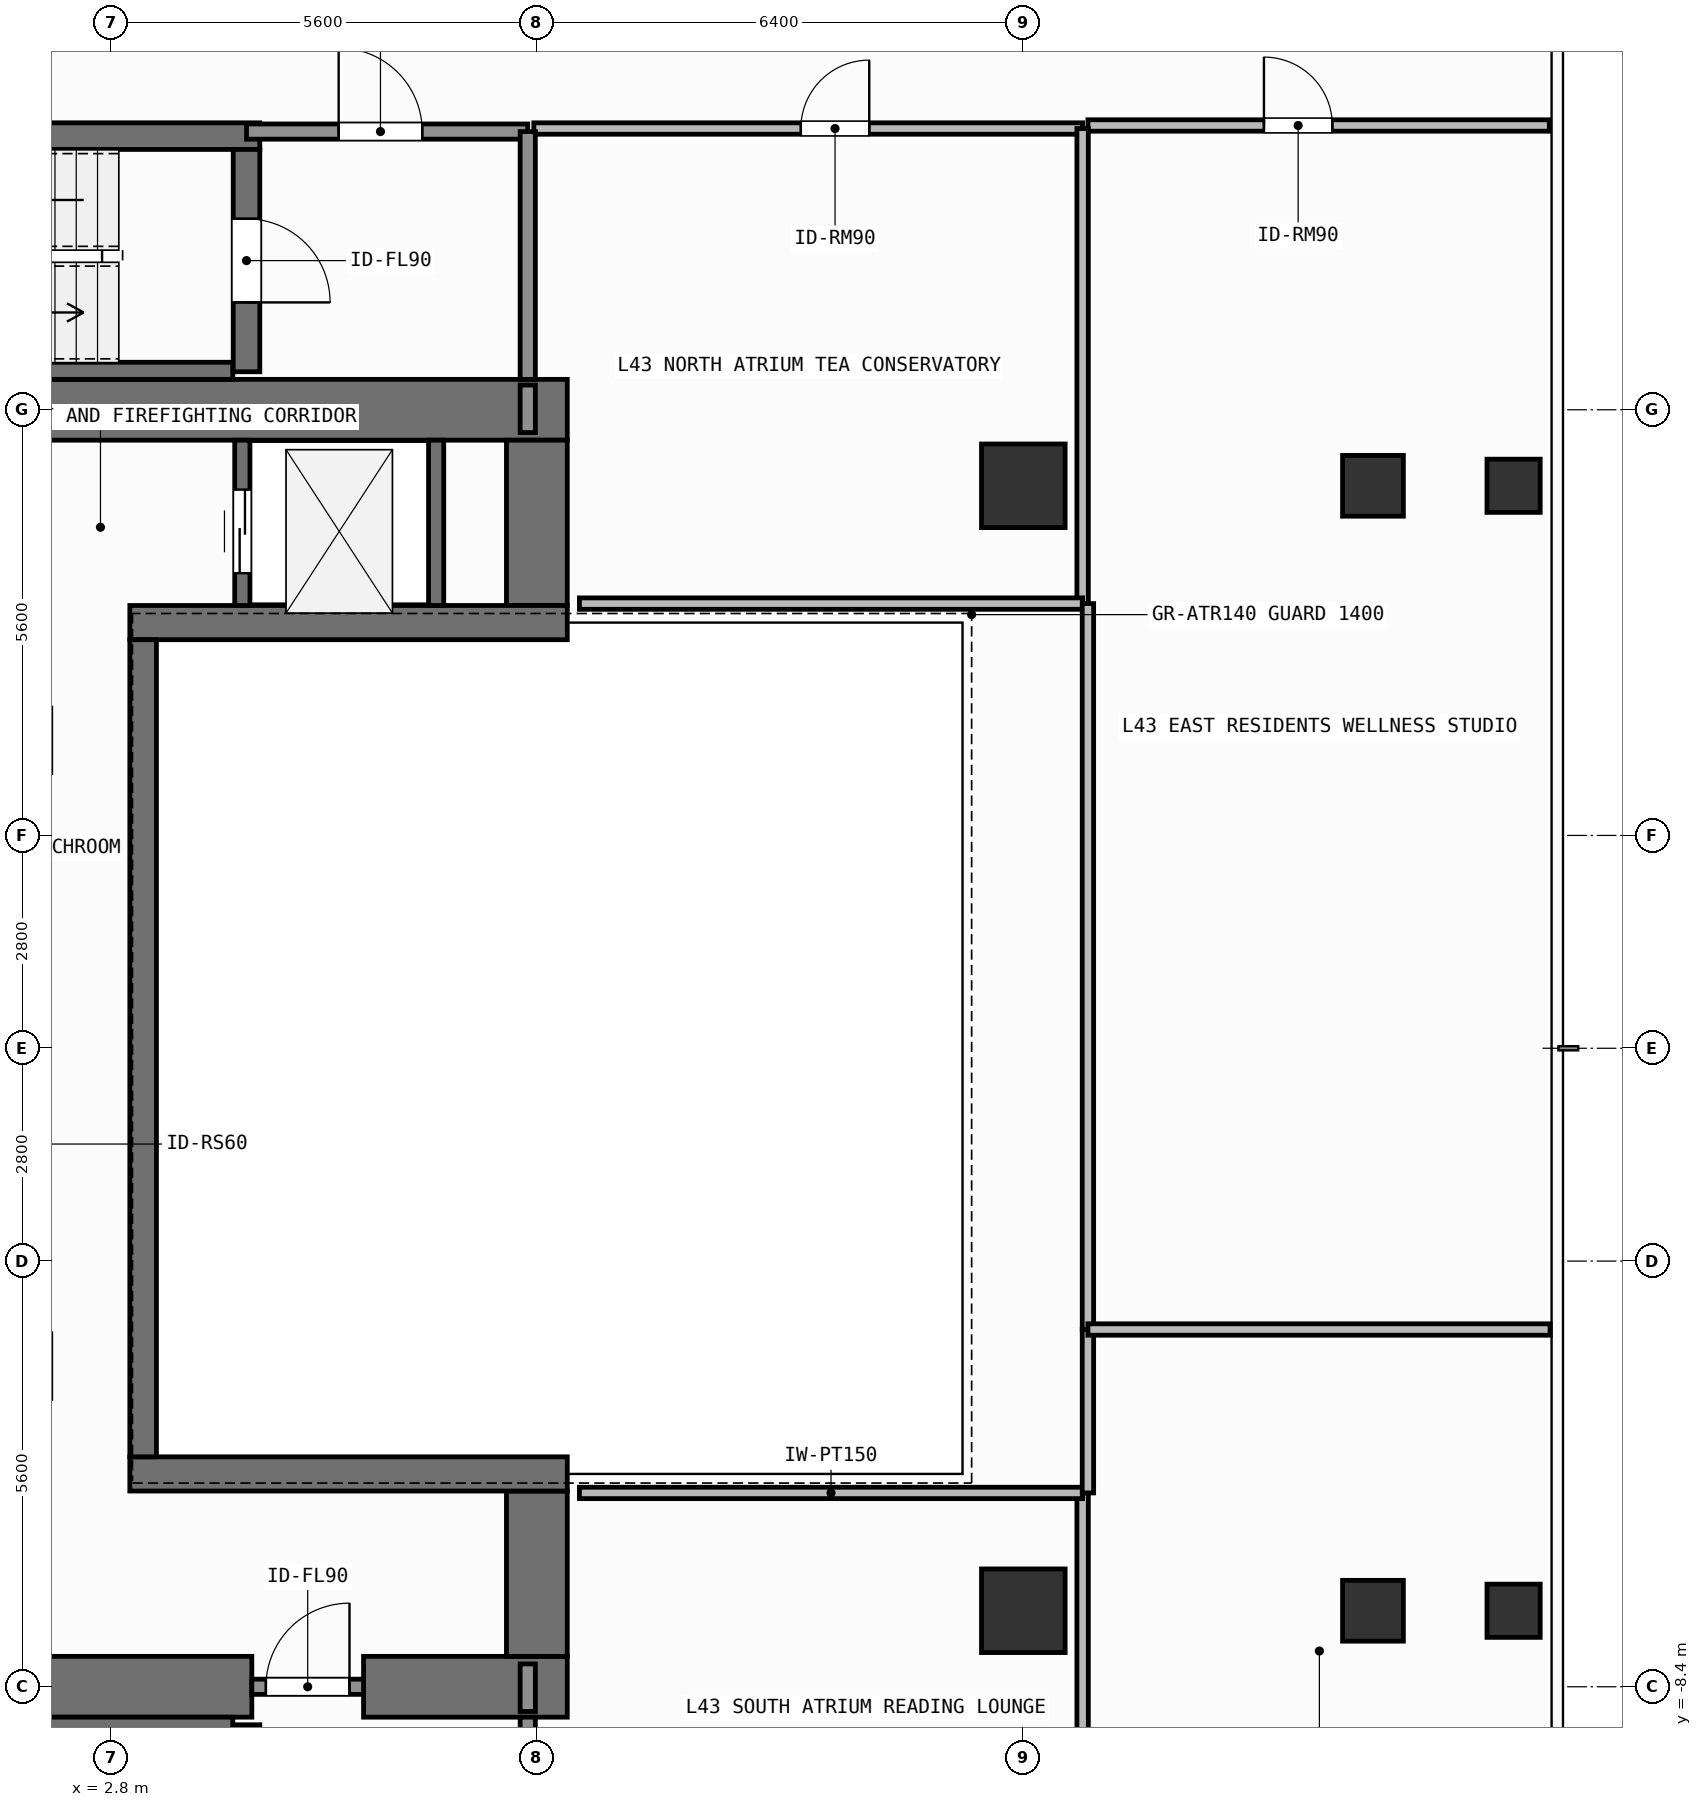
"""IFC4 building model, lengths in metres.
Left out: names, types, materials, properties, quantities, classifications, styles, units other than length and angle.
Written with IfcOpenShell. Run it as: python <this file> out.ifc"""

import sys

from ifc_helpers import new_model, si_unit, direction, frame, frame_2d, origin, origin_2d, place, context, subcontext, project, spatial, rectangle, hollow_rectangle, extrude, element, fill, save


model = new_model("IFC4")
c1 = context("Model", 3, precision=1e-05, world=origin(), true_north=direction((0.0, 1.0)))
c2 = subcontext(c1, "Body", "Model", "MODEL_VIEW")
j1 = project(units=[si_unit("LENGTHUNIT", "METRE"), si_unit("PLANEANGLEUNIT", "RADIAN")], contexts=[c1])
p1 = place(None, origin())
s1 = spatial("IfcSite", under=j1, at=p1, CompositionType="ELEMENT")
p2 = place(p1, origin())
s2 = spatial("IfcBuilding", under=s1, at=p2, CompositionType="ELEMENT")
p3 = place(p2, frame((0.0, 0.0, 175.8)))
s3 = spatial("IfcBuildingStorey", under=s2, at=p3, CompositionType="ELEMENT", Elevation=175.8)
p4 = place(p3, frame((-2.62, -8.4, 0.0), z_axis=(0.0, 0.0, 1.0), x_axis=(1.0, 0.0, 0.0)))
e1 = element("IfcWall", 1, at=p4, inside=s3, PredefinedType="SHEAR", context=c2, shape_type="SweptSolid", body=[
    extrude(rectangle(XDim=7.27, YDim=0.8, at=frame_2d((3.635, 0.0))), origin(), (0.0, 0.0, 1.0), 3.9),
])
p5 = place(p3, frame((6.12, -8.4, 0.0), z_axis=(0.0, 0.0, 1.0), x_axis=(1.0, 0.0, 0.0)))
e2 = element("IfcWall", 2, at=p5, inside=s3, PredefinedType="SHEAR", context=c2, shape_type="SweptSolid", body=[
    extrude(rectangle(XDim=2.68, YDim=0.8, at=frame_2d((1.34, 0.0))), origin(), (0.0, 0.0, 1.0), 3.9),
])
p6 = place(p3, frame((-7.55, 8.4, 0.0), z_axis=(0.0, 0.0, 1.0), x_axis=(1.0, 0.0, 0.0)))
e3 = element("IfcWall", 3, at=p6, inside=s3, PredefinedType="SHEAR", context=c2, shape_type="SweptSolid", body=[
    extrude(rectangle(XDim=16.35, YDim=0.8, at=frame_2d((8.175, 0.0))), origin(), (0.0, 0.0, 1.0), 3.9),
])
for number, where, z_axis, x_axis in (
    (4, (8.4, -8.0, 0.0), (0.0, 0.0, 1.0), (0.0, 1.0, 0.0)),
    (5, (8.4, 5.825, 0.0), (0.0, 0.0, 1.0), (0.0, 1.0, 0.0)),
):
    element("IfcWall", number, at=place(p3, frame(where, z_axis=z_axis, x_axis=x_axis)), inside=s3, PredefinedType="SHEAR", context=c2, shape_type="SweptSolid", body=[
        extrude(rectangle(XDim=2.175, YDim=0.8, at=frame_2d((1.087, 0.0))), origin(), (0.0, 0.0, 1.0), 3.9),
    ])
for number, where, z_axis, x_axis in (
    (6, (3.045, -5.6, 0.0), (0.0, 0.0, 1.0), (1.0, 0.0, 0.0)),
    (7, (3.045, 5.6, 0.0), (0.0, 0.0, 1.0), (1.0, 0.0, 0.0)),
):
    element("IfcWall", number, at=place(p3, frame(where, z_axis=z_axis, x_axis=x_axis)), inside=s3, PredefinedType="SHEAR", context=c2, shape_type="SweptSolid", body=[
        extrude(rectangle(XDim=5.755, YDim=0.45, at=frame_2d((2.877, 0.0))), origin(), (0.0, 0.0, 1.0), 3.9),
    ])
p7 = place(p3, frame((3.22, -5.375, 0.0), z_axis=(0.0, 0.0, 1.0), x_axis=(0.0, 1.0, 0.0)))
e8 = element("IfcWall", 8, at=p7, inside=s3, PredefinedType="SHEAR", context=c2, shape_type="SweptSolid", body=[
    extrude(rectangle(XDim=10.75, YDim=0.35, at=frame_2d((5.375, 0.0))), origin(), (0.0, 0.0, 1.0), 3.9),
])
p8 = place(p3, frame((-2.2, -8.913, 0.0), z_axis=(0.0, 0.0, 1.0), x_axis=(1.0, 0.0, 0.0)))
e9 = element("IfcWall", 9, at=p8, inside=s3, PredefinedType="SHEAR", context=c2, shape_type="SweptSolid", body=[
    extrude(rectangle(XDim=6.6, YDim=0.225, at=frame_2d((3.3, 0.0))), origin(), (0.0, 0.0, 1.0), 3.9),
])
p9 = place(p3, frame((4.58, -8.9, 0.0), z_axis=(0.0, 0.0, 1.0), x_axis=(0.0, -1.0, 0.0)))
e10 = element("IfcWall", 10, at=p9, inside=s3, PredefinedType="SHEAR", context=c2, shape_type="SweptSolid", body=[
    extrude(rectangle(XDim=2.925, YDim=0.35, at=frame_2d((1.462, 0.0))), origin(), (0.0, 0.0, 1.0), 3.9),
])
p10 = place(p9, frame((0.913, 0.0, 0.0)))
e11 = element("IfcOpeningElement", 11, at=p10, cuts=e10, PredefinedType="OPENING", context=c2, shape_type="SweptSolid", body=[
    extrude(rectangle(XDim=1.1, YDim=2.15, at=frame_2d((0.55, 1.075))), frame((0.0, 0.185, 0.0), z_axis=(0.0, -1.0, 0.0), x_axis=(1.0, 0.0, 0.0)), (0.0, 0.0, 1.0), 0.37),
])
p11 = place(p3, frame((-2.555, 12.0, 0.0), z_axis=(0.0, 0.0, 1.0), x_axis=(1.0, 0.0, 0.0)))
e12 = element("IfcWall", 12, at=p11, inside=s3, PredefinedType="SHEAR", context=c2, shape_type="SweptSolid", body=[
    extrude(rectangle(XDim=7.31, YDim=0.35, at=frame_2d((3.655, 0.0))), origin(), (0.0, 0.0, 1.0), 3.9),
])
p12 = place(p3, frame((-2.2, 8.913, 0.0), z_axis=(0.0, 0.0, 1.0), x_axis=(1.0, 0.0, 0.0)))
e13 = element("IfcWall", 13, at=p12, inside=s3, PredefinedType="SHEAR", context=c2, shape_type="SweptSolid", body=[
    extrude(rectangle(XDim=6.6, YDim=0.225, at=frame_2d((3.3, 0.0))), origin(), (0.0, 0.0, 1.0), 3.9),
])
p13 = place(p3, frame((4.58, 11.825, 0.0), z_axis=(0.0, 0.0, 1.0), x_axis=(0.0, -1.0, 0.0)))
e14 = element("IfcWall", 14, at=p13, inside=s3, PredefinedType="SHEAR", context=c2, shape_type="SweptSolid", body=[
    extrude(rectangle(XDim=2.925, YDim=0.35, at=frame_2d((1.462, 0.0))), origin(), (0.0, 0.0, 1.0), 3.9),
])
p14 = place(p13, frame((0.913, 0.0, 0.0)))
e15 = element("IfcOpeningElement", 15, at=p14, cuts=e14, PredefinedType="OPENING", context=c2, shape_type="SweptSolid", body=[
    extrude(rectangle(XDim=1.1, YDim=2.15, at=frame_2d((0.55, 1.075))), frame((0.0, 0.185, 0.0), z_axis=(0.0, -1.0, 0.0), x_axis=(1.0, 0.0, 0.0)), (0.0, 0.0, 1.0), 0.37),
])
for number, where, z_axis, x_axis in (
    (16, (14.8, -7.4, 0.0), (0.0, 0.0, 1.0), (1.0, 0.0, 0.0)),
    (17, (14.8, 7.4, 0.0), (0.0, 0.0, 1.0), (1.0, 0.0, 0.0)),
):
    element("IfcColumn", number, at=place(p3, frame(where, z_axis=z_axis, x_axis=x_axis)), inside=s3, PredefinedType="COLUMN", context=c2, shape_type="SweptSolid", body=[
        extrude(rectangle(XDim=1.1, YDim=1.1, at=origin_2d()), origin(), (0.0, 0.0, 1.0), 3.9),
    ])
for number, where, z_axis, x_axis in (
    (18, (19.4, -7.4, 0.0), (0.0, 0.0, 1.0), (1.0, 0.0, 0.0)),
    (19, (19.4, 7.4, 0.0), (0.0, 0.0, 1.0), (1.0, 0.0, 0.0)),
):
    element("IfcColumn", number, at=place(p3, frame(where, z_axis=z_axis, x_axis=x_axis)), inside=s3, PredefinedType="COLUMN", context=c2, shape_type="SweptSolid", body=[
        extrude(hollow_rectangle(XDim=0.8, YDim=0.8, WallThickness=0.036, at=origin_2d()), origin(), (0.0, 0.0, 1.0), 3.9),
    ])
for number, where, z_axis, x_axis in (
    (20, (21.25, -7.4, 0.0), (0.0, 0.0, 1.0), (1.0, 0.0, 0.0)),
    (21, (21.25, 7.4, 0.0), (0.0, 0.0, 1.0), (1.0, 0.0, 0.0)),
):
    element("IfcColumn", number, at=place(p3, frame(where, z_axis=z_axis, x_axis=x_axis)), inside=s3, PredefinedType="COLUMN", context=c2, shape_type="SweptSolid", body=[
        extrude(hollow_rectangle(XDim=0.7, YDim=0.7, WallThickness=0.032, at=origin_2d()), origin(), (0.0, 0.0, 1.0), 3.9),
    ])
p15 = place(p3, frame((4.525, 5.825, 0.0), z_axis=(0.0, 0.0, 1.0), x_axis=(0.0, 1.0, 0.0)))
e22 = element("IfcWall", 22, at=p15, inside=s3, PredefinedType="SHEAR", context=c2, shape_type="SweptSolid", body=[
    extrude(rectangle(XDim=2.175, YDim=0.2, at=frame_2d((1.087, 0.0))), origin(), (0.0, 0.0, 1.0), 3.68),
])
p16 = place(p15, frame((0.425, 0.0, 0.0)))
e23 = element("IfcOpeningElement", 23, at=p16, cuts=e22, PredefinedType="OPENING", context=c2, shape_type="SweptSolid", body=[
    extrude(rectangle(XDim=1.1, YDim=2.2, at=frame_2d((0.55, 1.1))), frame((0.0, 0.11, 0.0), z_axis=(0.0, -1.0, 0.0), x_axis=(1.0, 0.0, 0.0)), (0.0, 0.0, 1.0), 0.22),
])
p17 = place(p3, frame((7.075, 5.825, 0.0), z_axis=(0.0, 0.0, 1.0), x_axis=(0.0, 1.0, 0.0)))
e24 = element("IfcWall", 24, at=p17, inside=s3, PredefinedType="SHEAR", context=c2, shape_type="SweptSolid", body=[
    extrude(rectangle(XDim=2.175, YDim=0.2, at=frame_2d((1.087, 0.0))), origin(), (0.0, 0.0, 1.0), 3.68),
])
p18 = place(p3, frame((4.65, -8.4, 0.0), z_axis=(0.0, 0.0, 1.0), x_axis=(1.0, 0.0, 0.0)))
e25 = element("IfcWall", 25, at=p18, inside=s3, PredefinedType="SOLIDWALL", context=c2, shape_type="SweptSolid", body=[
    extrude(rectangle(XDim=1.47, YDim=0.2, at=frame_2d((0.735, 0.0))), origin(), (0.0, 0.0, 1.0), 2.82),
])
p19 = place(p18, frame((0.185, 0.0, 0.0)))
e26 = element("IfcOpeningElement", 26, at=p19, cuts=e25, PredefinedType="OPENING", context=c2, shape_type="SweptSolid", body=[
    extrude(rectangle(XDim=1.1, YDim=2.15, at=frame_2d((0.55, 1.075))), frame((0.0, 0.11, 0.0), z_axis=(0.0, -1.0, 0.0), x_axis=(1.0, 0.0, 0.0)), (0.0, 0.0, 1.0), 0.22),
])
p20 = place(p3, frame((4.58, 12.06, 0.0), z_axis=(0.0, 0.0, 1.0), x_axis=(1.0, 0.0, 0.0)))
e27 = element("IfcWall", 27, at=p20, inside=s3, PredefinedType="SOLIDWALL", context=c2, shape_type="SweptSolid", body=[
    extrude(rectangle(XDim=3.7, YDim=0.2, at=frame_2d((1.85, 0.0))), origin(), (0.0, 0.0, 1.0), 3.68),
])
p21 = place(p20, frame((1.212, 0.0, 0.0)))
e28 = element("IfcOpeningElement", 28, at=p21, cuts=e27, PredefinedType="OPENING", context=c2, shape_type="SweptSolid", body=[
    extrude(rectangle(XDim=1.1, YDim=2.15, at=frame_2d((0.55, 1.075))), frame((0.0, 0.11, 0.0), z_axis=(0.0, -1.0, 0.0), x_axis=(1.0, 0.0, 0.0)), (0.0, 0.0, 1.0), 0.22),
])
p22 = place(p3, frame((8.36, 12.1, 0.0), z_axis=(0.0, 0.0, 1.0), x_axis=(1.0, 0.0, 0.0)))
e29 = element("IfcWall", 29, at=p22, inside=s3, PredefinedType="PARTITIONING", context=c2, shape_type="SweptSolid", body=[
    extrude(rectangle(XDim=7.22, YDim=0.15, at=frame_2d((3.61, 0.0))), origin(), (0.0, 0.0, 1.0), 3.68),
])
p23 = place(p22, frame((3.513, 0.0, 0.0)))
e30 = element("IfcOpeningElement", 30, at=p23, cuts=e29, PredefinedType="OPENING", context=c2, shape_type="SweptSolid", body=[
    extrude(rectangle(XDim=0.9, YDim=2.1, at=frame_2d((0.45, 1.05))), frame((0.0, 0.085, 0.0), z_axis=(0.0, -1.0, 0.0), x_axis=(1.0, 0.0, 0.0)), (0.0, 0.0, 1.0), 0.17),
])
p24 = place(p3, frame((15.65, 12.14, 0.0), z_axis=(0.0, 0.0, 1.0), x_axis=(1.0, 0.0, 0.0)))
e31 = element("IfcWall", 31, at=p24, inside=s3, PredefinedType="PARTITIONING", context=c2, shape_type="SweptSolid", body=[
    extrude(rectangle(XDim=6.07, YDim=0.15, at=frame_2d((3.035, 0.0))), origin(), (0.0, 0.0, 1.0), 3.68),
])
p25 = place(p24, frame((2.316, 0.0, 0.0)))
e32 = element("IfcOpeningElement", 32, at=p25, cuts=e31, PredefinedType="OPENING", context=c2, shape_type="SweptSolid", body=[
    extrude(rectangle(XDim=0.9, YDim=2.1, at=frame_2d((0.45, 1.05))), frame((0.0, 0.085, 0.0), z_axis=(0.0, -1.0, 0.0), x_axis=(1.0, 0.0, 0.0)), (0.0, 0.0, 1.0), 0.17),
])
for number, where, z_axis, x_axis in (
    (33, (8.28, -12.06, 0.0), (0.0, 0.0, 1.0), (0.0, 1.0, 0.0)),
    (34, (8.28, 8.8, 0.0), (0.0, 0.0, 1.0), (0.0, 1.0, 0.0)),
):
    element("IfcWall", number, at=place(p3, frame(where, z_axis=z_axis, x_axis=x_axis)), inside=s3, PredefinedType="SOLIDWALL", context=c2, shape_type="SweptSolid", body=[
        extrude(rectangle(XDim=3.26, YDim=0.2, at=frame_2d((1.63, 0.0))), origin(), (0.0, 0.0, 1.0), 3.68),
    ])
p26 = place(p3, frame((8.28, -8.725, 0.0), z_axis=(0.0, 0.0, 1.0), x_axis=(0.0, 1.0, 0.0)))
e35 = element("IfcWall", 35, at=p26, inside=s3, PredefinedType="SOLIDWALL", context=c2, shape_type="SweptSolid", body=[
    extrude(rectangle(XDim=0.625, YDim=0.2, at=frame_2d((0.312, 0.0))), origin(), (0.0, 0.0, 1.0), 3.68),
])
p27 = place(p3, frame((15.58, -12.1, 0.0), z_axis=(0.0, 0.0, 1.0), x_axis=(0.0, 1.0, 0.0)))
e36 = element("IfcWall", 36, at=p27, inside=s3, PredefinedType="PARTITIONING", context=c2, shape_type="SweptSolid", body=[
    extrude(rectangle(XDim=6.25, YDim=0.15, at=frame_2d((3.125, 0.0))), origin(), (0.0, 0.0, 1.0), 3.68),
])
p28 = place(p3, frame((8.96, -5.85, 0.0), z_axis=(0.0, 0.0, 1.0), x_axis=(1.0, 0.0, 0.0)))
e37 = element("IfcWall", 37, at=p28, inside=s3, PredefinedType="PARTITIONING", context=c2, shape_type="SweptSolid", body=[
    extrude(rectangle(XDim=6.62, YDim=0.15, at=frame_2d((3.31, 0.0))), origin(), (0.0, 0.0, 1.0), 3.68),
])
p29 = place(p3, frame((8.28, 8.1, 0.0), z_axis=(0.0, 0.0, 1.0), x_axis=(0.0, 1.0, 0.0)))
e38 = element("IfcWall", 38, at=p29, inside=s3, PredefinedType="SOLIDWALL", context=c2, shape_type="SweptSolid", body=[
    extrude(rectangle(XDim=0.625, YDim=0.2, at=frame_2d((0.312, 0.0))), origin(), (0.0, 0.0, 1.0), 3.68),
])
p30 = place(p3, frame((15.58, 5.85, 0.0), z_axis=(0.0, 0.0, 1.0), x_axis=(0.0, 1.0, 0.0)))
e39 = element("IfcWall", 39, at=p30, inside=s3, PredefinedType="PARTITIONING", context=c2, shape_type="SweptSolid", body=[
    extrude(rectangle(XDim=6.25, YDim=0.15, at=frame_2d((3.125, 0.0))), origin(), (0.0, 0.0, 1.0), 3.68),
])
p31 = place(p3, frame((8.96, 5.85, 0.0), z_axis=(0.0, 0.0, 1.0), x_axis=(1.0, 0.0, 0.0)))
e40 = element("IfcWall", 40, at=p31, inside=s3, PredefinedType="PARTITIONING", context=c2, shape_type="SweptSolid", body=[
    extrude(rectangle(XDim=6.62, YDim=0.15, at=frame_2d((3.31, 0.0))), origin(), (0.0, 0.0, 1.0), 3.68),
])
p32 = place(p3, frame((15.65, -5.85, 0.0), z_axis=(0.0, 0.0, 1.0), x_axis=(0.0, 1.0, 0.0)))
e41 = element("IfcWall", 41, at=p32, inside=s3, PredefinedType="PARTITIONING", context=c2, shape_type="SweptSolid", body=[
    extrude(rectangle(XDim=2.15, YDim=0.15, at=frame_2d((1.075, 0.0))), origin(), (0.0, 0.0, 1.0), 3.68),
])
p33 = place(p3, frame((15.65, -3.7, 0.0), z_axis=(0.0, 0.0, 1.0), x_axis=(0.0, 1.0, 0.0)))
e42 = element("IfcWall", 42, at=p33, inside=s3, PredefinedType="PARTITIONING", context=c2, shape_type="SweptSolid", body=[
    extrude(rectangle(XDim=9.55, YDim=0.15, at=frame_2d((4.775, 0.0))), origin(), (0.0, 0.0, 1.0), 3.68),
])
p34 = place(p3, frame((15.65, -3.7, 0.0), z_axis=(0.0, 0.0, 1.0), x_axis=(1.0, 0.0, 0.0)))
e43 = element("IfcWall", 43, at=p34, inside=s3, PredefinedType="PARTITIONING", context=c2, shape_type="SweptSolid", body=[
    extrude(rectangle(XDim=6.08, YDim=0.15, at=frame_2d((3.04, 0.0))), origin(), (0.0, 0.0, 1.0), 3.68),
])
p35 = place(p16, origin())
e44 = element("IfcDoor", 44, at=p35, inside=s3, OperationType="SLIDING_TO_LEFT", PredefinedType="DOOR", context=c2, shape_type="SweptSolid", body=[
    extrude(rectangle(XDim=1.1, YDim=2.2, at=frame_2d((0.55, 1.1))), frame((0.0, 0.025, 0.0), z_axis=(0.0, -1.0, 0.0), x_axis=(1.0, 0.0, 0.0)), (0.0, 0.0, 1.0), 0.05),
])
fill(e23, e44)
p36 = place(p14, origin())
e45 = element("IfcDoor", 45, at=p36, inside=s3, OperationType="SINGLE_SWING_RIGHT", PredefinedType="DOOR", context=c2, shape_type="SweptSolid", body=[
    extrude(rectangle(XDim=1.1, YDim=2.15, at=frame_2d((0.55, 1.075))), frame((0.0, 0.025, 0.0), z_axis=(0.0, -1.0, 0.0), x_axis=(1.0, 0.0, 0.0)), (0.0, 0.0, 1.0), 0.05),
])
fill(e15, e45)
p37 = place(p19, origin())
e46 = element("IfcDoor", 46, at=p37, inside=s3, OperationType="SINGLE_SWING_RIGHT", PredefinedType="DOOR", context=c2, shape_type="SweptSolid", body=[
    extrude(rectangle(XDim=1.1, YDim=2.15, at=frame_2d((0.55, 1.075))), frame((0.0, 0.025, 0.0), z_axis=(0.0, -1.0, 0.0), x_axis=(1.0, 0.0, 0.0)), (0.0, 0.0, 1.0), 0.05),
])
fill(e26, e46)
p38 = place(p21, origin())
e47 = element("IfcDoor", 47, at=p38, inside=s3, OperationType="SINGLE_SWING_LEFT", PredefinedType="DOOR", context=c2, shape_type="SweptSolid", body=[
    extrude(rectangle(XDim=1.1, YDim=2.15, at=frame_2d((0.55, 1.075))), frame((0.0, 0.025, 0.0), z_axis=(0.0, -1.0, 0.0), x_axis=(1.0, 0.0, 0.0)), (0.0, 0.0, 1.0), 0.05),
])
fill(e28, e47)
p39 = place(p23, origin())
e48 = element("IfcDoor", 48, at=p39, inside=s3, OperationType="SINGLE_SWING_RIGHT", PredefinedType="DOOR", context=c2, shape_type="SweptSolid", body=[
    extrude(rectangle(XDim=0.9, YDim=2.1, at=frame_2d((0.45, 1.05))), frame((0.0, 0.025, 0.0), z_axis=(0.0, -1.0, 0.0), x_axis=(1.0, 0.0, 0.0)), (0.0, 0.0, 1.0), 0.05),
])
fill(e30, e48)
p40 = place(p25, origin())
e49 = element("IfcDoor", 49, at=p40, inside=s3, OperationType="SINGLE_SWING_LEFT", PredefinedType="DOOR", context=c2, shape_type="SweptSolid", body=[
    extrude(rectangle(XDim=0.9, YDim=2.1, at=frame_2d((0.45, 1.05))), frame((0.0, 0.025, 0.0), z_axis=(0.0, -1.0, 0.0), x_axis=(1.0, 0.0, 0.0)), (0.0, 0.0, 1.0), 0.05),
])
fill(e32, e49)
save(model, sys.argv[1])
